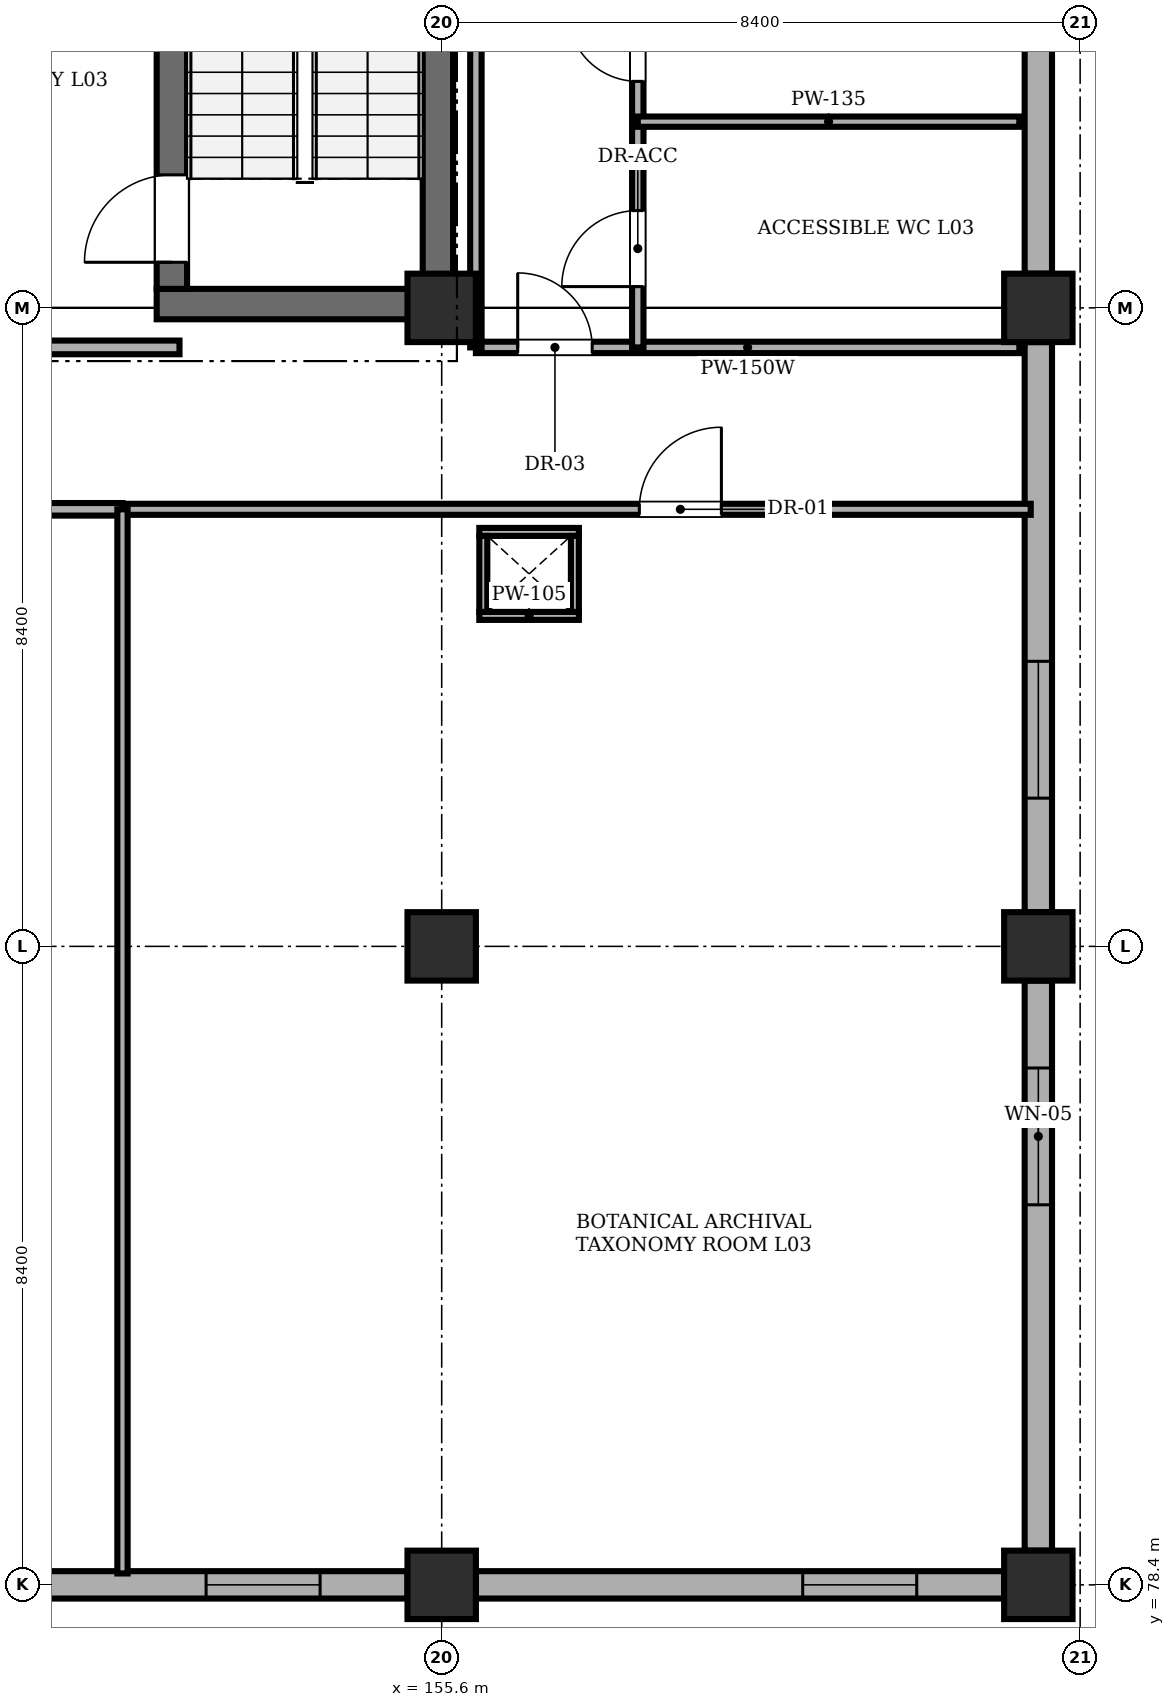
"""IFC4 building model, lengths in metres.
Left out: names, types, materials, properties, quantities, classifications, styles, units other than length and angle.
Written with IfcOpenShell. Run it as: python <this file> out.ifc"""

import sys

from ifc_helpers import new_model, si_unit, direction, frame, frame_2d, origin, origin_2d, place, context, subcontext, project, spatial, rectangle, extrude, element, fill, save


model = new_model("IFC4")
c1 = context("Model", 3, precision=1e-05, world=origin(), true_north=direction((0.0, 1.0)))
c2 = subcontext(c1, "Body", "Model", "MODEL_VIEW")
j1 = project(units=[si_unit("LENGTHUNIT", "METRE"), si_unit("PLANEANGLEUNIT", "RADIAN")], contexts=[c1])
p1 = place(None, origin())
s1 = spatial("IfcSite", under=j1, at=p1, CompositionType="ELEMENT")
p2 = place(p1, origin())
s2 = spatial("IfcBuilding", under=s1, at=p2, CompositionType="ELEMENT")
p3 = place(p2, frame((0.0, 0.0, 10.2)))
s3 = spatial("IfcBuildingStorey", under=s2, at=p3, CompositionType="ELEMENT", Elevation=10.2)
for number, where, z_axis, x_axis in (
    (1, (155.6, 78.4, 0.0), (0.0, 0.0, 1.0), (1.0, 0.0, 0.0)),
    (2, (155.6, 86.8, 0.0), (0.0, 0.0, 1.0), (1.0, 0.0, 0.0)),
    (3, (155.6, 95.2, 0.0), (0.0, 0.0, 1.0), (1.0, 0.0, 0.0)),
    (4, (163.45, 78.4, 0.0), (0.0, 0.0, 1.0), (1.0, 0.0, 0.0)),
    (5, (163.45, 86.8, 0.0), (0.0, 0.0, 1.0), (1.0, 0.0, 0.0)),
    (6, (163.45, 95.2, 0.0), (0.0, 0.0, 1.0), (1.0, 0.0, 0.0)),
):
    element("IfcColumn", number, at=place(p3, frame(where, z_axis=z_axis, x_axis=x_axis)), inside=s3, PredefinedType="COLUMN", context=c2, shape_type="SweptSolid", body=[
        extrude(rectangle(XDim=0.9, YDim=0.9, at=origin_2d()), origin(), (0.0, 0.0, 1.0), 4.26),
    ])
p4 = place(p3, frame((151.85, 95.25, 0.0), z_axis=(0.0, 0.0, 1.0), x_axis=(1.0, 0.0, 0.0)))
e7 = element("IfcWall", 7, at=p4, inside=s3, PredefinedType="SHEAR", context=c2, shape_type="SweptSolid", body=[
    extrude(rectangle(XDim=3.9, YDim=0.4, at=frame_2d((1.95, 0.0))), origin(), (0.0, 0.0, 1.0), 4.26),
])
p5 = place(p3, frame((152.05, 95.45, 0.0), z_axis=(0.0, 0.0, 1.0), x_axis=(0.0, 1.0, 0.0)))
e8 = element("IfcWall", 8, at=p5, inside=s3, PredefinedType="SHEAR", context=c2, shape_type="SweptSolid", body=[
    extrude(rectangle(XDim=7.9, YDim=0.4, at=frame_2d((3.95, 0.0))), origin(), (0.0, 0.0, 1.0), 4.26),
])
p6 = place(p5, frame((0.35, 0.0, 0.0)))
e9 = element("IfcOpeningElement", 9, at=p6, cuts=e8, PredefinedType="OPENING", context=c2, shape_type="SweptSolid", body=[
    extrude(rectangle(XDim=1.15, YDim=2.15, at=frame_2d((0.575, 1.075))), frame((0.0, 0.21, 0.0), z_axis=(0.0, -1.0, 0.0), x_axis=(1.0, 0.0, 0.0)), (0.0, 0.0, 1.0), 0.42),
])
p7 = place(p3, frame((155.55, 95.45, 0.0), z_axis=(0.0, 0.0, 1.0), x_axis=(0.0, 1.0, 0.0)))
e10 = element("IfcWall", 10, at=p7, inside=s3, PredefinedType="SHEAR", context=c2, shape_type="SweptSolid", body=[
    extrude(rectangle(XDim=7.9, YDim=0.4, at=frame_2d((3.95, 0.0))), origin(), (0.0, 0.0, 1.0), 4.26),
])
p8 = place(p3, frame((155.15, 78.4, 0.0), z_axis=(0.0, 0.0, 1.0), x_axis=(-1.0, 0.0, 0.0)))
e11 = element("IfcWall", 11, at=p8, inside=s3, PredefinedType="STANDARD", context=c2, shape_type="SweptSolid", body=[
    extrude(rectangle(XDim=7.5, YDim=0.36, at=frame_2d((3.75, 0.0))), origin(), (0.0, 0.0, 1.0), 3.16),
])
p9 = place(p8, frame((1.15, 0.0, 0.95)))
e12 = element("IfcOpeningElement", 12, at=p9, cuts=e11, PredefinedType="OPENING", context=c2, shape_type="SweptSolid", body=[
    extrude(rectangle(XDim=1.5, YDim=1.5, at=frame_2d((0.75, 0.75))), frame((0.0, 0.19, 0.0), z_axis=(0.0, -1.0, 0.0), x_axis=(1.0, 0.0, 0.0)), (0.0, 0.0, 1.0), 0.38),
])
p10 = place(p3, frame((163.0, 78.4, 0.0), z_axis=(0.0, 0.0, 1.0), x_axis=(-1.0, 0.0, 0.0)))
e13 = element("IfcWall", 13, at=p10, inside=s3, PredefinedType="STANDARD", context=c2, shape_type="SweptSolid", body=[
    extrude(rectangle(XDim=6.95, YDim=0.36, at=frame_2d((3.475, 0.0))), origin(), (0.0, 0.0, 1.0), 3.16),
])
p11 = place(p10, frame((1.15, 0.0, 0.95)))
e14 = element("IfcOpeningElement", 14, at=p11, cuts=e13, PredefinedType="OPENING", context=c2, shape_type="SweptSolid", body=[
    extrude(rectangle(XDim=1.5, YDim=1.5, at=frame_2d((0.75, 0.75))), frame((0.0, 0.19, 0.0), z_axis=(0.0, -1.0, 0.0), x_axis=(1.0, 0.0, 0.0)), (0.0, 0.0, 1.0), 0.38),
])
p12 = place(p3, frame((163.45, 86.35, 0.0), z_axis=(0.0, 0.0, 1.0), x_axis=(0.0, -1.0, 0.0)))
e15 = element("IfcWall", 15, at=p12, inside=s3, PredefinedType="STANDARD", context=c2, shape_type="SweptSolid", body=[
    extrude(rectangle(XDim=7.5, YDim=0.36, at=frame_2d((3.75, 0.0))), origin(), (0.0, 0.0, 1.0), 3.51),
])
p13 = place(p12, frame((1.15, 0.0, 1.1)))
e16 = element("IfcOpeningElement", 16, at=p13, cuts=e15, PredefinedType="OPENING", context=c2, shape_type="SweptSolid", body=[
    extrude(rectangle(XDim=1.8, YDim=1.8, at=frame_2d((0.9, 0.9))), frame((0.0, 0.19, 0.0), z_axis=(0.0, -1.0, 0.0), x_axis=(1.0, 0.0, 0.0)), (0.0, 0.0, 1.0), 0.38),
])
p14 = place(p3, frame((163.45, 94.75, 0.0), z_axis=(0.0, 0.0, 1.0), x_axis=(0.0, -1.0, 0.0)))
e17 = element("IfcWall", 17, at=p14, inside=s3, PredefinedType="STANDARD", context=c2, shape_type="SweptSolid", body=[
    extrude(rectangle(XDim=7.5, YDim=0.36, at=frame_2d((3.75, 0.0))), origin(), (0.0, 0.0, 1.0), 3.51),
])
p15 = place(p14, frame((4.2, 0.0, 1.1)))
e18 = element("IfcOpeningElement", 18, at=p15, cuts=e17, PredefinedType="OPENING", context=c2, shape_type="SweptSolid", body=[
    extrude(rectangle(XDim=1.8, YDim=1.8, at=frame_2d((0.9, 0.9))), frame((0.0, 0.19, 0.0), z_axis=(0.0, -1.0, 0.0), x_axis=(1.0, 0.0, 0.0)), (0.0, 0.0, 1.0), 0.38),
])
p16 = place(p3, frame((163.45, 103.15, 0.0), z_axis=(0.0, 0.0, 1.0), x_axis=(0.0, -1.0, 0.0)))
e19 = element("IfcWall", 19, at=p16, inside=s3, PredefinedType="STANDARD", context=c2, shape_type="SweptSolid", body=[
    extrude(rectangle(XDim=7.5, YDim=0.36, at=frame_2d((3.75, 0.0))), origin(), (0.0, 0.0, 1.0), 3.51),
])
p17 = place(p16, frame((1.15, 0.0, 1.1)))
e20 = element("IfcOpeningElement", 20, at=p17, cuts=e19, PredefinedType="OPENING", context=c2, shape_type="SweptSolid", body=[
    extrude(rectangle(XDim=1.4, YDim=1.4, at=frame_2d((0.7, 0.7))), frame((0.0, 0.19, 0.0), z_axis=(0.0, -1.0, 0.0), x_axis=(1.0, 0.0, 0.0)), (0.0, 0.0, 1.0), 0.38),
])
p18 = place(p3, frame((147.3, 94.68, 0.0), z_axis=(0.0, 0.0, 1.0), x_axis=(1.0, 0.0, 0.0)))
e21 = element("IfcWall", 21, at=p18, inside=s3, PredefinedType="STANDARD", context=c2, shape_type="SweptSolid", body=[
    extrude(rectangle(XDim=4.85, YDim=0.18, at=frame_2d((2.425, 0.0))), origin(), (0.0, 0.0, 1.0), 4.26),
])
p19 = place(p18, frame((1.6, 0.0, 0.0)))
e22 = element("IfcOpeningElement", 22, at=p19, cuts=e21, PredefinedType="OPENING", context=c2, shape_type="SweptSolid", body=[
    extrude(rectangle(XDim=1.15, YDim=2.15, at=frame_2d((0.575, 1.075))), frame((0.0, 0.1, 0.0), z_axis=(0.0, -1.0, 0.0), x_axis=(1.0, 0.0, 0.0)), (0.0, 0.0, 1.0), 0.2),
])
p20 = place(p3, frame((156.05, 94.68, 0.0), z_axis=(0.0, 0.0, 1.0), x_axis=(1.0, 0.0, 0.0)))
e23 = element("IfcWall", 23, at=p20, inside=s3, PredefinedType="PARTITIONING", context=c2, shape_type="SweptSolid", body=[
    extrude(rectangle(XDim=7.15, YDim=0.15, at=frame_2d((3.575, 0.0))), origin(), (0.0, 0.0, 1.0), 4.26),
])
p21 = place(p20, frame((0.55, 0.0, 0.0)))
e24 = element("IfcOpeningElement", 24, at=p21, cuts=e23, PredefinedType="OPENING", context=c2, shape_type="SweptSolid", body=[
    extrude(rectangle(XDim=0.98, YDim=2.12, at=frame_2d((0.49, 1.06))), frame((0.0, 0.085, 0.0), z_axis=(0.0, -1.0, 0.0), x_axis=(1.0, 0.0, 0.0)), (0.0, 0.0, 1.0), 0.17),
])
p22 = place(p3, frame((158.18, 94.68, 0.0), z_axis=(0.0, 0.0, 1.0), x_axis=(0.0, 1.0, 0.0)))
e25 = element("IfcWall", 25, at=p22, inside=s3, PredefinedType="PARTITIONING", context=c2, shape_type="SweptSolid", body=[
    extrude(rectangle(XDim=8.57, YDim=0.15, at=frame_2d((4.285, 0.0))), origin(), (0.0, 0.0, 1.0), 4.26),
])
p23 = place(p22, frame((0.8, 0.0, 0.0)))
e26 = element("IfcOpeningElement", 26, at=p23, cuts=e25, PredefinedType="OPENING", context=c2, shape_type="SweptSolid", body=[
    extrude(rectangle(XDim=1.0, YDim=2.12, at=frame_2d((0.5, 1.06))), frame((0.0, 0.085, 0.0), z_axis=(0.0, -1.0, 0.0), x_axis=(1.0, 0.0, 0.0)), (0.0, 0.0, 1.0), 0.17),
])
p24 = place(p22, frame((3.5, 0.0, 0.0)))
e27 = element("IfcOpeningElement", 27, at=p24, cuts=e25, PredefinedType="OPENING", context=c2, shape_type="SweptSolid", body=[
    extrude(rectangle(XDim=0.92, YDim=2.1, at=frame_2d((0.46, 1.05))), frame((0.0, 0.085, 0.0), z_axis=(0.0, -1.0, 0.0), x_axis=(1.0, 0.0, 0.0)), (0.0, 0.0, 1.0), 0.17),
])
p25 = place(p22, frame((6.4, 0.0, 0.0)))
e28 = element("IfcOpeningElement", 28, at=p25, cuts=e25, PredefinedType="OPENING", context=c2, shape_type="SweptSolid", body=[
    extrude(rectangle(XDim=0.92, YDim=2.1, at=frame_2d((0.46, 1.05))), frame((0.0, 0.085, 0.0), z_axis=(0.0, -1.0, 0.0), x_axis=(1.0, 0.0, 0.0)), (0.0, 0.0, 1.0), 0.17),
])
p26 = place(p3, frame((158.18, 97.65, 0.0), z_axis=(0.0, 0.0, 1.0), x_axis=(1.0, 0.0, 0.0)))
e29 = element("IfcWall", 29, at=p26, inside=s3, PredefinedType="PARTITIONING", context=c2, shape_type="SweptSolid", body=[
    extrude(rectangle(XDim=5.02, YDim=0.135, at=frame_2d((2.51, 0.0))), origin(), (0.0, 0.0, 1.0), 4.26),
])
p27 = place(p3, frame((156.05, 94.68, 0.0), z_axis=(0.0, 0.0, 1.0), x_axis=(0.0, 1.0, 0.0)))
e30 = element("IfcWall", 30, at=p27, inside=s3, PredefinedType="PARTITIONING", context=c2, shape_type="SweptSolid", body=[
    extrude(rectangle(XDim=8.57, YDim=0.15, at=frame_2d((4.285, 0.0))), origin(), (0.0, 0.0, 1.0), 4.26),
])
p28 = place(p3, frame((138.8, 92.55, 0.0), z_axis=(0.0, 0.0, 1.0), x_axis=(1.0, 0.0, 0.0)))
e31 = element("IfcWall", 31, at=p28, inside=s3, PredefinedType="PARTITIONING", context=c2, shape_type="SweptSolid", body=[
    extrude(rectangle(XDim=12.6, YDim=0.165, at=frame_2d((6.3, 0.0))), origin(), (0.0, 0.0, 1.0), 4.26),
])
p29 = place(p28, frame((3.4, 0.0, 0.0)))
e32 = element("IfcOpeningElement", 32, at=p29, cuts=e31, PredefinedType="OPENING", context=c2, shape_type="SweptSolid", body=[
    extrude(rectangle(XDim=1.02, YDim=2.15, at=frame_2d((0.51, 1.075))), frame((0.0, 0.093, 0.0), z_axis=(0.0, -1.0, 0.0), x_axis=(1.0, 0.0, 0.0)), (0.0, 0.0, 1.0), 0.185),
])
p30 = place(p3, frame((151.4, 92.55, 0.0), z_axis=(0.0, 0.0, 1.0), x_axis=(1.0, 0.0, 0.0)))
e33 = element("IfcWall", 33, at=p30, inside=s3, PredefinedType="PARTITIONING", context=c2, shape_type="SweptSolid", body=[
    extrude(rectangle(XDim=11.95, YDim=0.145, at=frame_2d((5.975, 0.0))), origin(), (0.0, 0.0, 1.0), 4.26),
])
p31 = place(p30, frame((6.8, 0.0, 0.0)))
e34 = element("IfcOpeningElement", 34, at=p31, cuts=e33, PredefinedType="OPENING", context=c2, shape_type="SweptSolid", body=[
    extrude(rectangle(XDim=1.08, YDim=2.15, at=frame_2d((0.54, 1.075))), frame((0.0, 0.083, 0.0), z_axis=(0.0, -1.0, 0.0), x_axis=(1.0, 0.0, 0.0)), (0.0, 0.0, 1.0), 0.165),
])
p32 = place(p3, frame((151.4, 78.55, 0.0), z_axis=(0.0, 0.0, 1.0), x_axis=(0.0, 1.0, 0.0)))
e35 = element("IfcWall", 35, at=p32, inside=s3, PredefinedType="PARTITIONING", context=c2, shape_type="SweptSolid", body=[
    extrude(rectangle(XDim=14.0, YDim=0.135, at=frame_2d((7.0, 0.0))), origin(), (0.0, 0.0, 1.0), 3.71),
])
for number, where, z_axis, x_axis in (
    (36, (156.095, 91.147, 0.0), (0.0, 0.0, 1.0), (1.0, 0.0, 0.0)),
    (37, (156.095, 92.252, 0.0), (0.0, 0.0, 1.0), (1.0, 0.0, 0.0)),
):
    element("IfcWall", number, at=place(p3, frame(where, z_axis=z_axis, x_axis=x_axis)), inside=s3, PredefinedType="PARTITIONING", context=c2, shape_type="SweptSolid", body=[
        extrude(rectangle(XDim=1.31, YDim=0.105, at=frame_2d((0.655, 0.0))), origin(), (0.0, 0.0, 1.0), 4.26),
    ])
for number, where, z_axis, x_axis in (
    (38, (156.147, 91.2, 0.0), (0.0, 0.0, 1.0), (0.0, 1.0, 0.0)),
    (39, (157.353, 91.2, 0.0), (0.0, 0.0, 1.0), (0.0, 1.0, 0.0)),
):
    element("IfcWall", number, at=place(p3, frame(where, z_axis=z_axis, x_axis=x_axis)), inside=s3, PredefinedType="PARTITIONING", context=c2, shape_type="SweptSolid", body=[
        extrude(rectangle(XDim=1.0, YDim=0.105, at=frame_2d((0.5, 0.0))), origin(), (0.0, 0.0, 1.0), 4.26),
    ])
p33 = place(p9, origin())
e40 = element("IfcWindow", 40, at=p33, inside=s3, PartitioningType="DOUBLE_PANEL_VERTICAL", PredefinedType="WINDOW", context=c2, shape_type="SweptSolid", body=[
    extrude(rectangle(XDim=1.5, YDim=1.5, at=frame_2d((0.75, 0.75))), frame((0.0, 0.03, 0.0), z_axis=(0.0, -1.0, 0.0), x_axis=(1.0, 0.0, 0.0)), (0.0, 0.0, 1.0), 0.06),
])
fill(e12, e40)
p34 = place(p11, origin())
e41 = element("IfcWindow", 41, at=p34, inside=s3, PartitioningType="DOUBLE_PANEL_VERTICAL", PredefinedType="WINDOW", context=c2, shape_type="SweptSolid", body=[
    extrude(rectangle(XDim=1.5, YDim=1.5, at=frame_2d((0.75, 0.75))), frame((0.0, 0.03, 0.0), z_axis=(0.0, -1.0, 0.0), x_axis=(1.0, 0.0, 0.0)), (0.0, 0.0, 1.0), 0.06),
])
fill(e14, e41)
p35 = place(p13, origin())
e42 = element("IfcWindow", 42, at=p35, inside=s3, PartitioningType="DOUBLE_PANEL_VERTICAL", PredefinedType="WINDOW", context=c2, shape_type="SweptSolid", body=[
    extrude(rectangle(XDim=1.8, YDim=1.8, at=frame_2d((0.9, 0.9))), frame((0.0, 0.03, 0.0), z_axis=(0.0, -1.0, 0.0), x_axis=(1.0, 0.0, 0.0)), (0.0, 0.0, 1.0), 0.06),
])
fill(e16, e42)
p36 = place(p15, origin())
e43 = element("IfcWindow", 43, at=p36, inside=s3, PartitioningType="DOUBLE_PANEL_VERTICAL", PredefinedType="WINDOW", context=c2, shape_type="SweptSolid", body=[
    extrude(rectangle(XDim=1.8, YDim=1.8, at=frame_2d((0.9, 0.9))), frame((0.0, 0.03, 0.0), z_axis=(0.0, -1.0, 0.0), x_axis=(1.0, 0.0, 0.0)), (0.0, 0.0, 1.0), 0.06),
])
fill(e18, e43)
p37 = place(p21, origin())
e44 = element("IfcDoor", 44, at=p37, inside=s3, OperationType="SINGLE_SWING_LEFT", PredefinedType="DOOR", context=c2, shape_type="SweptSolid", body=[
    extrude(rectangle(XDim=0.98, YDim=2.12, at=frame_2d((0.49, 1.06))), frame((0.0, 0.025, 0.0), z_axis=(0.0, -1.0, 0.0), x_axis=(1.0, 0.0, 0.0)), (0.0, 0.0, 1.0), 0.05),
])
fill(e24, e44)
p38 = place(p23, origin())
e45 = element("IfcDoor", 45, at=p38, inside=s3, OperationType="SINGLE_SWING_LEFT", PredefinedType="DOOR", context=c2, shape_type="SweptSolid", body=[
    extrude(rectangle(XDim=1.0, YDim=2.12, at=frame_2d((0.5, 1.06))), frame((0.0, 0.025, 0.0), z_axis=(0.0, -1.0, 0.0), x_axis=(1.0, 0.0, 0.0)), (0.0, 0.0, 1.0), 0.05),
])
fill(e26, e45)
p39 = place(p24, origin())
e46 = element("IfcDoor", 46, at=p39, inside=s3, OperationType="SINGLE_SWING_RIGHT", PredefinedType="DOOR", context=c2, shape_type="SweptSolid", body=[
    extrude(rectangle(XDim=0.92, YDim=2.1, at=frame_2d((0.46, 1.05))), frame((0.0, 0.025, 0.0), z_axis=(0.0, -1.0, 0.0), x_axis=(1.0, 0.0, 0.0)), (0.0, 0.0, 1.0), 0.05),
])
fill(e27, e46)
p40 = place(p31, origin())
e47 = element("IfcDoor", 47, at=p40, inside=s3, OperationType="SINGLE_SWING_RIGHT", PredefinedType="DOOR", context=c2, shape_type="SweptSolid", body=[
    extrude(rectangle(XDim=1.08, YDim=2.15, at=frame_2d((0.54, 1.075))), frame((0.0, 0.025, 0.0), z_axis=(0.0, -1.0, 0.0), x_axis=(1.0, 0.0, 0.0)), (0.0, 0.0, 1.0), 0.05),
])
fill(e34, e47)
p41 = place(p6, origin())
e48 = element("IfcDoor", 48, at=p41, inside=s3, OperationType="SINGLE_SWING_LEFT", PredefinedType="DOOR", context=c2, shape_type="SweptSolid", body=[
    extrude(rectangle(XDim=1.15, YDim=2.15, at=frame_2d((0.575, 1.075))), frame((0.0, 0.025, 0.0), z_axis=(0.0, -1.0, 0.0), x_axis=(1.0, 0.0, 0.0)), (0.0, 0.0, 1.0), 0.05),
])
fill(e9, e48)
save(model, sys.argv[1])
